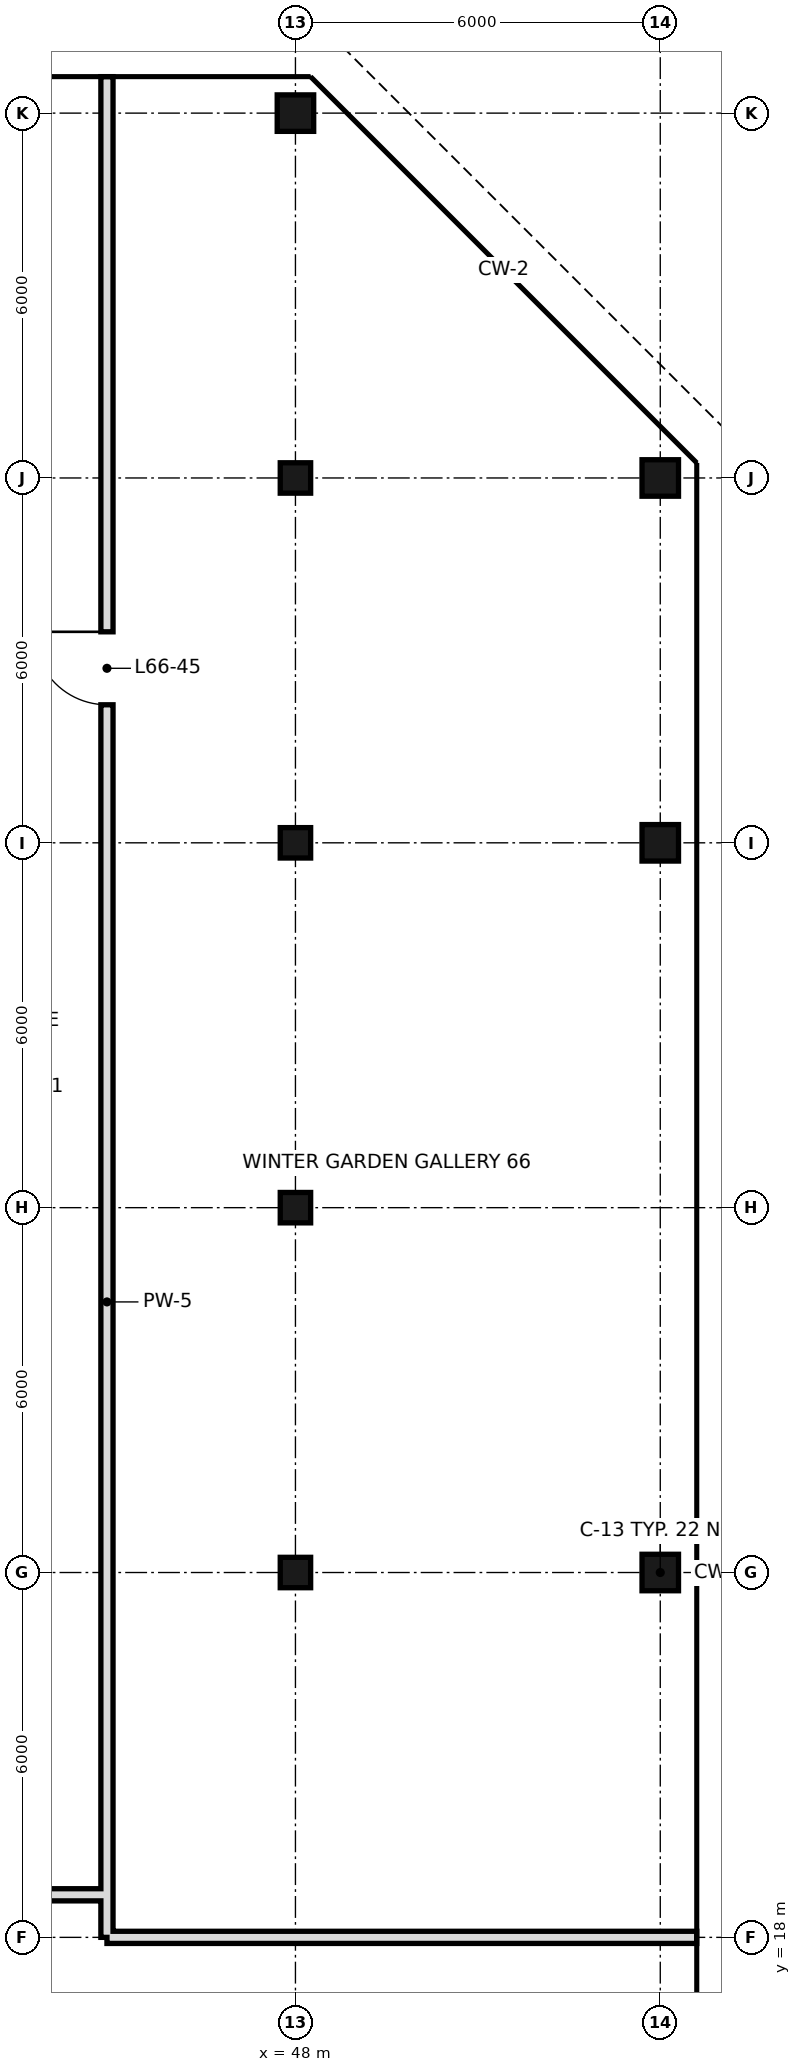
"""IFC4 building model, lengths in metres.
Left out: names, types, materials, properties, quantities, classifications, styles, units other than length and angle.
Written with IfcOpenShell. Run it as: python <this file> out.ifc"""

import sys

from ifc_helpers import new_model, si_unit, direction, frame, frame_2d, origin, origin_2d, place, context, subcontext, project, spatial, rectangle, hollow_rectangle, extrude, element, fill, save


model = new_model("IFC4")
c1 = context("Model", 3, precision=1e-05, world=origin(), true_north=direction((0.0, 1.0)))
c2 = subcontext(c1, "Body", "Model", "MODEL_VIEW")
j1 = project(units=[si_unit("LENGTHUNIT", "METRE"), si_unit("PLANEANGLEUNIT", "RADIAN")], contexts=[c1])
p1 = place(None, origin())
s1 = spatial("IfcSite", under=j1, at=p1, CompositionType="ELEMENT")
p2 = place(p1, origin())
s2 = spatial("IfcBuilding", under=s1, at=p2, CompositionType="ELEMENT")
p3 = place(p2, frame((0.0, 0.0, 277.4)))
s3 = spatial("IfcBuildingStorey", under=s2, at=p3, CompositionType="ELEMENT", Elevation=277.4)
for number, where, z_axis, x_axis in (
    (1, (48.0, 24.0, 0.0), (0.0, 0.0, 1.0), (1.0, 0.0, 0.0)),
    (2, (48.0, 30.0, 0.0), (0.0, 0.0, 1.0), (1.0, 0.0, 0.0)),
    (3, (48.0, 36.0, 0.0), (0.0, 0.0, 1.0), (1.0, 0.0, 0.0)),
    (4, (48.0, 42.0, 0.0), (0.0, 0.0, 1.0), (1.0, 0.0, 0.0)),
):
    element("IfcColumn", number, at=place(p3, frame(where, z_axis=z_axis, x_axis=x_axis)), inside=s3, PredefinedType="COLUMN", context=c2, shape_type="SweptSolid", body=[
        extrude(hollow_rectangle(XDim=0.5, YDim=0.5, WallThickness=0.025, at=origin_2d()), origin(), (0.0, 0.0, 1.0), 4.4),
    ])
for number, where, z_axis, x_axis in (
    (5, (48.0, 48.0, 0.0), (0.0, 0.0, 1.0), (1.0, 0.0, 0.0)),
    (6, (54.0, 24.0, 0.0), (0.0, 0.0, 1.0), (1.0, 0.0, 0.0)),
    (7, (54.0, 36.0, 0.0), (0.0, 0.0, 1.0), (1.0, 0.0, 0.0)),
    (8, (54.0, 42.0, 0.0), (0.0, 0.0, 1.0), (1.0, 0.0, 0.0)),
):
    element("IfcColumn", number, at=place(p3, frame(where, z_axis=z_axis, x_axis=x_axis)), inside=s3, PredefinedType="COLUMN", context=c2, shape_type="SweptSolid", body=[
        extrude(hollow_rectangle(XDim=0.6, YDim=0.6, WallThickness=0.028, at=origin_2d()), origin(), (0.0, 0.0, 1.0), 4.4),
    ])
p4 = place(p3, frame((44.9, 18.0, 0.0), z_axis=(0.0, 0.0, 1.0), x_axis=(0.0, 1.0, 0.0)))
e9 = element("IfcWall", 9, at=p4, inside=s3, PredefinedType="SOLIDWALL", context=c2, shape_type="SweptSolid", body=[
    extrude(rectangle(XDim=30.6, YDim=0.2, at=frame_2d((15.3, 0.0))), origin(), (0.0, 0.0, 1.0), 3.65),
])
p5 = place(p4, frame((20.27, 0.0, 0.0)))
e10 = element("IfcOpeningElement", 10, at=p5, cuts=e9, PredefinedType="OPENING", context=c2, shape_type="SweptSolid", body=[
    extrude(rectangle(XDim=1.2, YDim=2.4, at=frame_2d((0.6, 1.2))), frame((0.0, 0.11, 0.0), z_axis=(0.0, -1.0, 0.0), x_axis=(1.0, 0.0, 0.0)), (0.0, 0.0, 1.0), 0.22),
])
p6 = place(p3, frame((44.9, 18.0, 0.0), z_axis=(0.0, 0.0, 1.0), x_axis=(1.0, 0.0, 0.0)))
e11 = element("IfcWall", 11, at=p6, inside=s3, PredefinedType="SOLIDWALL", context=c2, shape_type="SweptSolid", body=[
    extrude(rectangle(XDim=9.7, YDim=0.2, at=frame_2d((4.85, 0.0))), origin(), (0.0, 0.0, 1.0), 3.4),
])
p7 = place(p3, frame((25.8, 18.7, 0.0), z_axis=(0.0, 0.0, 1.0), x_axis=(1.0, 0.0, 0.0)))
e12 = element("IfcWall", 12, at=p7, inside=s3, PredefinedType="SOLIDWALL", context=c2, shape_type="SweptSolid", body=[
    extrude(rectangle(XDim=19.1, YDim=0.2, at=frame_2d((9.55, 0.0))), origin(), (0.0, 0.0, 1.0), 3.4),
])
p8 = place(p7, frame((12.6, 0.0, 0.0)))
e13 = element("IfcOpeningElement", 13, at=p8, cuts=e12, PredefinedType="OPENING", context=c2, shape_type="SweptSolid", body=[
    extrude(rectangle(XDim=1.2, YDim=2.4, at=frame_2d((0.6, 1.2))), frame((0.0, 0.11, 0.0), z_axis=(0.0, -1.0, 0.0), x_axis=(1.0, 0.0, 0.0)), (0.0, 0.0, 1.0), 0.22),
])
p9 = place(p5, frame((1.2, 0.0, 0.0), z_axis=(0.0, 0.0, 1.0), x_axis=(-1.0, 0.0, 0.0)))
e14 = element("IfcDoor", 14, at=p9, inside=s3, OperationType="SINGLE_SWING_LEFT", PredefinedType="DOOR", context=c2, shape_type="SweptSolid", body=[
    extrude(rectangle(XDim=1.2, YDim=2.4, at=frame_2d((0.6, 1.2))), frame((0.0, 0.025, 0.0), z_axis=(0.0, -1.0, 0.0), x_axis=(1.0, 0.0, 0.0)), (0.0, 0.0, 1.0), 0.05),
])
fill(e10, e14)
save(model, sys.argv[1])
